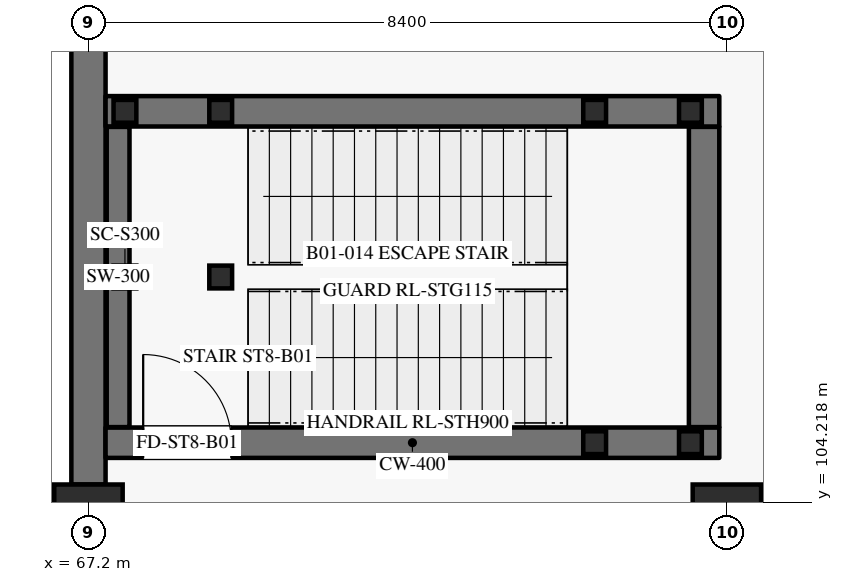
"""IFC4 building model, lengths in metres.
Left out: names, types, materials, properties, quantities, classifications, styles, units other than length and angle.
Written with IfcOpenShell. Run it as: python <this file> out.ifc"""

import sys

from ifc_helpers import new_model, si_unit, direction, frame, frame_2d, origin, origin_2d, place, context, subcontext, project, spatial, rectangle, hollow_rectangle, extrude, element, fill, save


model = new_model("IFC4")
c1 = context("Model", 3, precision=1e-05, world=origin(), true_north=direction((0.0, 1.0)))
c2 = subcontext(c1, "Body", "Model", "MODEL_VIEW")
j1 = project(units=[si_unit("LENGTHUNIT", "METRE"), si_unit("PLANEANGLEUNIT", "RADIAN")], contexts=[c1])
p1 = place(None, origin())
s1 = spatial("IfcSite", under=j1, at=p1, CompositionType="ELEMENT")
p2 = place(p1, origin())
s2 = spatial("IfcBuilding", under=s1, at=p2, CompositionType="ELEMENT")
p3 = place(p2, frame((0.0, 0.0, -5.4)))
s3 = spatial("IfcBuildingStorey", under=s2, at=p3, CompositionType="ELEMENT", Elevation=-5.4)
for number, where, z_axis, x_axis in (
    (1, (67.2, 104.0, 0.0), (0.0, 0.0, 1.0), (1.0, 0.0, 0.0)),
    (2, (75.6, 104.0, 0.0), (0.0, 0.0, 1.0), (1.0, 0.0, 0.0)),
):
    element("IfcColumn", number, at=place(p3, frame(where, z_axis=z_axis, x_axis=x_axis)), inside=s3, PredefinedType="COLUMN", context=c2, shape_type="SweptSolid", body=[
        extrude(rectangle(XDim=0.9, YDim=0.9, at=origin_2d()), origin(), (0.0, 0.0, 1.0), 5.4),
    ])
p4 = place(p3, frame((67.2, 104.45, 0.0), z_axis=(0.0, 0.0, 1.0), x_axis=(0.0, 1.0, 0.0)))
e3 = element("IfcWall", 3, at=p4, inside=s3, PredefinedType="USERDEFINED", context=c2, shape_type="SweptSolid", body=[
    extrude(rectangle(XDim=7.1, YDim=0.45, at=frame_2d((3.55, 0.0))), origin(), (0.0, 0.0, 1.0), 4.3),
])
p5 = place(p3, frame((67.425, 105.0, 0.0), z_axis=(0.0, 0.0, 1.0), x_axis=(1.0, 0.0, 0.0)))
e4 = element("IfcWall", 4, at=p5, inside=s3, PredefinedType="SHEAR", context=c2, shape_type="SweptSolid", body=[
    extrude(rectangle(XDim=8.075, YDim=0.4, at=frame_2d((4.038, 0.0))), origin(), (0.0, 0.0, 1.0), 4.995),
])
p6 = place(p5, frame((0.495, 0.0, 0.0)))
e5 = element("IfcOpeningElement", 5, at=p6, cuts=e4, PredefinedType="OPENING", context=c2, shape_type="SweptSolid", body=[
    extrude(rectangle(XDim=1.16, YDim=2.2, at=frame_2d((0.58, 1.1))), frame((0.0, 0.21, 0.0), z_axis=(0.0, -1.0, 0.0), x_axis=(1.0, 0.0, 0.0)), (0.0, 0.0, 1.0), 0.42),
])
p7 = place(p3, frame((75.3, 105.205, 0.0), z_axis=(0.0, 0.0, 1.0), x_axis=(0.0, 1.0, 0.0)))
e6 = element("IfcWall", 6, at=p7, inside=s3, PredefinedType="SHEAR", context=c2, shape_type="SweptSolid", body=[
    extrude(rectangle(XDim=3.95, YDim=0.4, at=frame_2d((1.975, 0.0))), origin(), (0.0, 0.0, 1.0), 4.995),
])
p8 = place(p3, frame((67.425, 109.36, 0.0), z_axis=(0.0, 0.0, 1.0), x_axis=(1.0, 0.0, 0.0)))
e7 = element("IfcWall", 7, at=p8, inside=s3, PredefinedType="SHEAR", context=c2, shape_type="SweptSolid", body=[
    extrude(rectangle(XDim=8.075, YDim=0.4, at=frame_2d((4.038, 0.0))), origin(), (0.0, 0.0, 1.0), 4.995),
])
p9 = place(p3, frame((67.59, 105.205, 0.0), z_axis=(0.0, 0.0, 1.0), x_axis=(0.0, 1.0, 0.0)))
e8 = element("IfcWall", 8, at=p9, inside=s3, PredefinedType="SHEAR", context=c2, shape_type="SweptSolid", body=[
    extrude(rectangle(XDim=3.95, YDim=0.3, at=frame_2d((1.975, 0.0))), origin(), (0.0, 0.0, 1.0), 4.995),
])
for number, where, z_axis, x_axis in (
    (9, (67.68, 107.18, 0.0), (0.0, 0.0, 1.0), (1.0, 0.0, 0.0)),
    (10, (67.68, 109.36, 0.0), (0.0, 0.0, 1.0), (1.0, 0.0, 0.0)),
    (11, (68.94, 107.18, 0.0), (0.0, 0.0, 1.0), (1.0, 0.0, 0.0)),
    (12, (68.94, 109.36, 0.0), (0.0, 0.0, 1.0), (1.0, 0.0, 0.0)),
):
    element("IfcColumn", number, at=place(p3, frame(where, z_axis=z_axis, x_axis=x_axis)), inside=s3, PredefinedType="COLUMN", context=c2, shape_type="SweptSolid", body=[
        extrude(hollow_rectangle(XDim=0.3, YDim=0.3, WallThickness=0.012, at=origin_2d()), origin(), (0.0, 0.0, 1.0), 5.22),
    ])
for number, where, z_axis, x_axis in (
    (13, (73.86, 105.0, 0.0), (0.0, 0.0, 1.0), (1.0, 0.0, 0.0)),
    (14, (73.86, 109.36, 0.0), (0.0, 0.0, 1.0), (1.0, 0.0, 0.0)),
    (15, (75.12, 105.0, 0.0), (0.0, 0.0, 1.0), (1.0, 0.0, 0.0)),
    (16, (75.12, 109.36, 0.0), (0.0, 0.0, 1.0), (1.0, 0.0, 0.0)),
):
    element("IfcColumn", number, at=place(p3, frame(where, z_axis=z_axis, x_axis=x_axis)), inside=s3, PredefinedType="COLUMN", context=c2, shape_type="SweptSolid", body=[
        extrude(hollow_rectangle(XDim=0.3, YDim=0.3, WallThickness=0.012, at=origin_2d()), origin(), (0.0, 0.0, 1.0), 2.52),
    ])
p10 = place(p6, origin())
e17 = element("IfcDoor", 17, at=p10, inside=s3, OperationType="SINGLE_SWING_LEFT", PredefinedType="DOOR", context=c2, shape_type="SweptSolid", body=[
    extrude(rectangle(XDim=1.16, YDim=2.2, at=frame_2d((0.58, 1.1))), frame((0.0, 0.025, 0.0), z_axis=(0.0, -1.0, 0.0), x_axis=(1.0, 0.0, 0.0)), (0.0, 0.0, 1.0), 0.05),
])
fill(e5, e17)
save(model, sys.argv[1])
